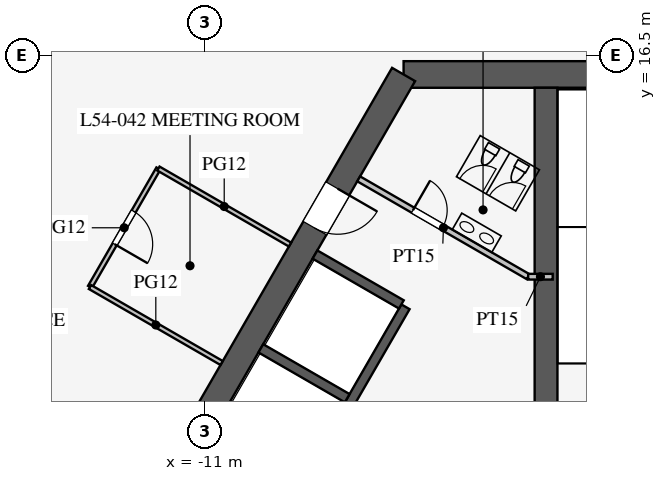
"""IFC4 building model, lengths in metres.
Left out: names, types, materials, properties, quantities, classifications, styles, units other than length and angle.
Written with IfcOpenShell. Run it as: python <this file> out.ifc"""

import sys

from ifc_helpers import new_model, si_unit, direction, frame, frame_2d, origin, place, context, subcontext, project, spatial, rectangle, extrude, element, fill, save


model = new_model("IFC4")
c1 = context("Model", 3, precision=1e-05, world=origin(), true_north=direction((0.0, 1.0)))
c2 = subcontext(c1, "Body", "Model", "MODEL_VIEW")
j1 = project(units=[si_unit("LENGTHUNIT", "METRE"), si_unit("PLANEANGLEUNIT", "RADIAN")], contexts=[c1])
p1 = place(None, origin())
s1 = spatial("IfcSite", under=j1, at=p1, CompositionType="ELEMENT")
p2 = place(p1, origin())
s2 = spatial("IfcBuilding", under=s1, at=p2, CompositionType="ELEMENT")
p3 = place(p2, frame((0.0, 0.0, 235.9)))
s3 = spatial("IfcBuildingStorey", under=s2, at=p3, CompositionType="ELEMENT", Elevation=235.9)
p4 = place(p3, frame((5.773, 16.0, 0.0), z_axis=(0.0, 0.0, 1.0), x_axis=(-1.0, 0.0, 0.0)))
e1 = element("IfcWall", 1, at=p4, inside=s3, PredefinedType="SHEAR", context=c2, shape_type="SweptSolid", body=[
    extrude(rectangle(XDim=11.547, YDim=0.7, at=frame_2d((5.773, 0.0))), origin(), (0.0, 0.0, 1.0), 4.2),
])
p5 = place(p3, frame((-5.773, 16.0, 0.0), z_axis=(0.0, 0.0, 1.0), x_axis=(-0.500002442456, -0.866023993627, 0.0)))
e2 = element("IfcWall", 2, at=p5, inside=s3, PredefinedType="SHEAR", context=c2, shape_type="SweptSolid", body=[
    extrude(rectangle(XDim=21.939, YDim=0.7, at=frame_2d((10.97, 0.0))), origin(), (0.0, 0.0, 1.0), 4.2),
])
p6 = place(p5, frame((17.27, 0.0, 0.0)))
e3 = element("IfcOpeningElement", 3, at=p6, cuts=e2, PredefinedType="OPENING", context=c2, shape_type="SweptSolid", body=[
    extrude(rectangle(XDim=1.2, YDim=2.1, at=frame_2d((0.6, 1.05))), frame((0.0, 0.36, 0.0), z_axis=(0.0, -1.0, 0.0), x_axis=(1.0, 0.0, 0.0)), (0.0, 0.0, 1.0), 0.72),
])
p7 = place(p5, frame((3.47, 0.0, 0.0)))
e4 = element("IfcOpeningElement", 4, at=p7, cuts=e2, PredefinedType="OPENING", context=c2, shape_type="SweptSolid", body=[
    extrude(rectangle(XDim=1.2, YDim=2.1, at=frame_2d((0.6, 1.05))), frame((0.0, 0.36, 0.0), z_axis=(0.0, -1.0, 0.0), x_axis=(1.0, 0.0, 0.0)), (0.0, 0.0, 1.0), 0.72),
])
p8 = place(p3, frame((-5.724, 9.886, 0.0), z_axis=(0.0, 0.0, 1.0), x_axis=(-0.500001763848, -0.866024385424, 0.0)))
e5 = element("IfcWall", 5, at=p8, inside=s3, PredefinedType="SHEAR", context=c2, shape_type="SweptSolid", body=[
    extrude(rectangle(XDim=11.4, YDim=0.25, at=frame_2d((5.7, 0.0))), origin(), (0.0, 0.0, 1.0), 4.2),
])
p9 = place(p8, frame((6.525, 0.0, 0.0)))
e6 = element("IfcOpeningElement", 6, at=p9, cuts=e5, PredefinedType="OPENING", context=c2, shape_type="SweptSolid", body=[
    extrude(rectangle(XDim=1.2, YDim=2.2, at=frame_2d((0.6, 1.1))), frame((0.0, 0.135, 0.0), z_axis=(0.0, -1.0, 0.0), x_axis=(1.0, 0.0, 0.0)), (0.0, 0.0, 1.0), 0.27),
])
p10 = place(p8, frame((9.375, 0.0, 0.0)))
e7 = element("IfcOpeningElement", 7, at=p10, cuts=e5, PredefinedType="OPENING", context=c2, shape_type="SweptSolid", body=[
    extrude(rectangle(XDim=1.2, YDim=2.2, at=frame_2d((0.6, 1.1))), frame((0.0, 0.135, 0.0), z_axis=(0.0, -1.0, 0.0), x_axis=(1.0, 0.0, 0.0)), (0.0, 0.0, 1.0), 0.27),
])
for number, where, z_axis, x_axis in (
    (8, (-5.832, 9.949, 0.0), (0.0, 0.0, 1.0), (-0.866, 0.5, 0.0)),
    (9, (-7.257, 7.481, 0.0), (0.0, 0.0, 1.0), (-0.866, 0.5, 0.0)),
):
    element("IfcWall", number, at=place(p3, frame(where, z_axis=z_axis, x_axis=x_axis)), inside=s3, PredefinedType="SHEAR", context=c2, shape_type="SweptSolid", body=[
        extrude(rectangle(XDim=2.625, YDim=0.25, at=frame_2d((1.312, 0.0))), origin(), (0.0, 0.0, 1.0), 4.2),
    ])
p11 = place(p3, frame((-2.025, 6.525, 0.0), z_axis=(0.0, 0.0, 1.0), x_axis=(0.0, 1.0, 0.0)))
e10 = element("IfcWall", 10, at=p11, inside=s3, PredefinedType="SHEAR", context=c2, shape_type="SweptSolid", body=[
    extrude(rectangle(XDim=9.125, YDim=0.6, at=frame_2d((4.562, 0.0))), origin(), (0.0, 0.0, 1.0), 4.2),
])
p12 = place(p3, frame((-2.495, 10.678, 0.0), z_axis=(0.0, 0.0, 1.0), x_axis=(-0.866037967349, 0.499978238636, 0.0)))
e11 = element("IfcWall", 11, at=p12, inside=s3, PredefinedType="PARTITIONING", context=c2, shape_type="SweptSolid", body=[
    extrude(rectangle(XDim=5.15, YDim=0.15, at=frame_2d((2.575, 0.0))), origin(), (0.0, 0.0, 1.0), 4.0),
])
p13 = place(p12, frame((2.6, 0.0, 0.0)))
e12 = element("IfcOpeningElement", 12, at=p13, cuts=e11, PredefinedType="OPENING", context=c2, shape_type="SweptSolid", body=[
    extrude(rectangle(XDim=0.9, YDim=2.1, at=frame_2d((0.45, 1.05))), frame((0.0, 0.085, 0.0), z_axis=(0.0, -1.0, 0.0), x_axis=(1.0, 0.0, 0.0)), (0.0, 0.0, 1.0), 0.17),
])
p14 = place(p3, frame((-2.495, 10.678, 0.0), z_axis=(0.0, 0.0, 1.0), x_axis=(1.0, 0.0, 0.0)))
e13 = element("IfcWall", 13, at=p14, inside=s3, PredefinedType="PARTITIONING", context=c2, shape_type="SweptSolid", body=[
    extrude(rectangle(XDim=0.645, YDim=0.15, at=frame_2d((0.323, 0.0))), origin(), (0.0, 0.0, 1.0), 4.0),
])
p15 = place(p3, frame((-12.226, 13.525, 0.0), z_axis=(0.0, 0.0, 1.0), x_axis=(-0.500012057535, -0.866018442252, 0.0)))
e14 = element("IfcWall", 14, at=p15, inside=s3, PredefinedType="PARTITIONING", context=c2, shape_type="SweptSolid", body=[
    extrude(rectangle(XDim=3.6, YDim=0.12, at=frame_2d((1.8, 0.0))), origin(), (0.0, 0.0, 1.0), 2.9),
])
p16 = place(p15, frame((1.3, 0.0, 0.15)))
e15 = element("IfcOpeningElement", 15, at=p16, cuts=e14, PredefinedType="OPENING", context=c2, shape_type="SweptSolid", body=[
    extrude(rectangle(XDim=1.0, YDim=2.1, at=frame_2d((0.5, 1.05))), frame((0.0, 0.07, 0.0), z_axis=(0.0, -1.0, 0.0), x_axis=(1.0, 0.0, 0.0)), (0.0, 0.0, 1.0), 0.14),
])
for number, where, z_axis, x_axis in (
    (16, (-10.562, 8.407, 0.0), (0.0, 0.0, 1.0), (-0.866, 0.5, 0.0)),
    (17, (-8.761, 11.525, 0.0), (0.0, 0.0, 1.0), (-0.866, 0.5, 0.0)),
):
    element("IfcWall", number, at=place(p3, frame(where, z_axis=z_axis, x_axis=x_axis)), inside=s3, PredefinedType="PARTITIONING", context=c2, shape_type="SweptSolid", body=[
        extrude(rectangle(XDim=4.0, YDim=0.12, at=frame_2d((2.0, 0.0))), origin(), (0.0, 0.0, 1.0), 2.9),
    ])
p17 = place(p13, frame((0.9, 0.0, 0.0), z_axis=(0.0, 0.0, 1.0), x_axis=(-1.0, 0.0, 0.0)))
e18 = element("IfcDoor", 18, at=p17, inside=s3, OperationType="SINGLE_SWING_LEFT", PredefinedType="DOOR", context=c2, shape_type="SweptSolid", body=[
    extrude(rectangle(XDim=0.9, YDim=2.1, at=frame_2d((0.45, 1.05))), frame((0.0, 0.025, 0.0), z_axis=(0.0, -1.0, 0.0), x_axis=(1.0, 0.0, 0.0)), (0.0, 0.0, 1.0), 0.05),
])
fill(e12, e18)
p18 = place(p7, origin())
e19 = element("IfcDoor", 19, at=p18, inside=s3, OperationType="SINGLE_SWING_LEFT", PredefinedType="DOOR", context=c2, shape_type="SweptSolid", body=[
    extrude(rectangle(XDim=1.2, YDim=2.1, at=frame_2d((0.6, 1.05))), frame((0.0, 0.025, 0.0), z_axis=(0.0, -1.0, 0.0), x_axis=(1.0, 0.0, 0.0)), (0.0, 0.0, 1.0), 0.05),
])
fill(e4, e19)
p19 = place(p16, origin())
e20 = element("IfcDoor", 20, at=p19, inside=s3, OperationType="SINGLE_SWING_RIGHT", PredefinedType="DOOR", context=c2, shape_type="SweptSolid", body=[
    extrude(rectangle(XDim=1.0, YDim=2.1, at=frame_2d((0.5, 1.05))), frame((0.0, 0.025, 0.0), z_axis=(0.0, -1.0, 0.0), x_axis=(1.0, 0.0, 0.0)), (0.0, 0.0, 1.0), 0.05),
])
fill(e15, e20)
save(model, sys.argv[1])
